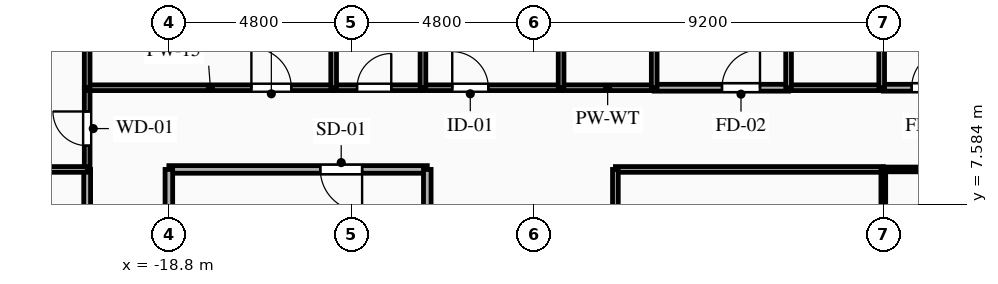
"""IFC4 building model, lengths in metres.
Left out: names, types, materials, properties, quantities, classifications, styles, units other than length and angle.
Written with IfcOpenShell. Run it as: python <this file> out.ifc"""

import sys

from ifc_helpers import new_model, si_unit, direction, frame, frame_2d, origin, place, context, subcontext, project, spatial, rectangle, extrude, element, fill, save


model = new_model("IFC4")
c1 = context("Model", 3, precision=1e-05, world=origin(), true_north=direction((0.0, 1.0)))
c2 = subcontext(c1, "Body", "Model", "MODEL_VIEW")
j1 = project(units=[si_unit("LENGTHUNIT", "METRE"), si_unit("PLANEANGLEUNIT", "RADIAN")], contexts=[c1])
p1 = place(None, origin())
s1 = spatial("IfcSite", under=j1, at=p1, CompositionType="ELEMENT")
p2 = place(p1, origin())
s2 = spatial("IfcBuilding", under=s1, at=p2, CompositionType="ELEMENT")
p3 = place(p2, frame((0.0, 0.0, 137.7)))
s3 = spatial("IfcBuildingStorey", under=s2, at=p3, CompositionType="ELEMENT", Elevation=137.7)
p4 = place(p3, frame((-12.0, 8.5, 0.0), z_axis=(0.0, 0.0, 1.0), x_axis=(-1.0, 0.0, 0.0)))
e1 = element("IfcWall", 1, at=p4, inside=s3, PredefinedType="PARTITIONING", context=c2, shape_type="SweptSolid", body=[
    extrude(rectangle(XDim=6.8, YDim=0.2, at=frame_2d((3.4, 0.0))), origin(), (0.0, 0.0, 1.0), 3.04),
])
p5 = place(p4, frame((1.715, 0.0, 0.0)))
e2 = element("IfcOpeningElement", 2, at=p5, cuts=e1, PredefinedType="OPENING", context=c2, shape_type="SweptSolid", body=[
    extrude(rectangle(XDim=1.1, YDim=2.15, at=frame_2d((0.55, 1.075))), frame((0.0, 0.11, 0.0), z_axis=(0.0, -1.0, 0.0), x_axis=(1.0, 0.0, 0.0)), (0.0, 0.0, 1.0), 0.22),
])
p6 = place(p3, frame((-18.8, 8.5, 0.0), z_axis=(0.0, 0.0, 1.0), x_axis=(0.0, -1.0, 0.0)))
e3 = element("IfcWall", 3, at=p6, inside=s3, PredefinedType="PARTITIONING", context=c2, shape_type="SweptSolid", body=[
    extrude(rectangle(XDim=2.9, YDim=0.2, at=frame_2d((1.45, 0.0))), origin(), (0.0, 0.0, 1.0), 2.525),
])
p7 = place(p3, frame((-12.0, 5.6, 0.0), z_axis=(0.0, 0.0, 1.0), x_axis=(0.0, 1.0, 0.0)))
e4 = element("IfcWall", 4, at=p7, inside=s3, PredefinedType="PARTITIONING", context=c2, shape_type="SweptSolid", body=[
    extrude(rectangle(XDim=2.9, YDim=0.2, at=frame_2d((1.45, 0.0))), origin(), (0.0, 0.0, 1.0), 3.04),
])
p8 = place(p3, frame((-20.95, 8.5, 0.0), z_axis=(0.0, 0.0, 1.0), x_axis=(0.0, 1.0, 0.0)))
e5 = element("IfcWall", 5, at=p8, inside=s3, PredefinedType="PARTITIONING", context=c2, shape_type="SweptSolid", body=[
    extrude(rectangle(XDim=2.15, YDim=0.15, at=frame_2d((1.075, 0.0))), origin(), (0.0, 0.0, 1.0), 3.04),
])
p9 = place(p8, frame((0.625, 0.0, 0.0)))
e6 = element("IfcOpeningElement", 6, at=p9, cuts=e5, PredefinedType="OPENING", context=c2, shape_type="SweptSolid", body=[
    extrude(rectangle(XDim=0.9, YDim=2.1, at=frame_2d((0.45, 1.05))), frame((0.0, 0.085, 0.0), z_axis=(0.0, -1.0, 0.0), x_axis=(1.0, 0.0, 0.0)), (0.0, 0.0, 1.0), 0.17),
])
p10 = place(p3, frame((-20.95, 10.65, 0.0), z_axis=(0.0, 0.0, 1.0), x_axis=(1.0, 0.0, 0.0)))
e7 = element("IfcWall", 7, at=p10, inside=s3, PredefinedType="PARTITIONING", context=c2, shape_type="SweptSolid", body=[
    extrude(rectangle(XDim=6.486, YDim=0.15, at=frame_2d((3.243, 0.0))), origin(), (0.0, 0.0, 1.0), 3.04),
])
p11 = place(p10, frame((4.322, 0.0, 0.0)))
e8 = element("IfcOpeningElement", 8, at=p11, cuts=e7, PredefinedType="OPENING", context=c2, shape_type="SweptSolid", body=[
    extrude(rectangle(XDim=1.05, YDim=2.15, at=frame_2d((0.525, 1.075))), frame((0.0, 0.085, 0.0), z_axis=(0.0, -1.0, 0.0), x_axis=(1.0, 0.0, 0.0)), (0.0, 0.0, 1.0), 0.17),
])
p12 = place(p3, frame((-14.464, 10.65, 0.0), z_axis=(0.0, 0.0, 1.0), x_axis=(1.0, 0.0, 0.0)))
e9 = element("IfcWall", 9, at=p12, inside=s3, PredefinedType="PLUMBINGWALL", context=c2, shape_type="SweptSolid", body=[
    extrude(rectangle(XDim=2.35, YDim=0.15, at=frame_2d((1.175, 0.0))), origin(), (0.0, 0.0, 1.0), 3.04),
])
p13 = place(p12, frame((0.616, 0.0, 0.0)))
e10 = element("IfcOpeningElement", 10, at=p13, cuts=e9, PredefinedType="OPENING", context=c2, shape_type="SweptSolid", body=[
    extrude(rectangle(XDim=0.9, YDim=2.1, at=frame_2d((0.45, 1.05))), frame((0.0, 0.085, 0.0), z_axis=(0.0, -1.0, 0.0), x_axis=(1.0, 0.0, 0.0)), (0.0, 0.0, 1.0), 0.17),
])
p14 = place(p3, frame((-12.114, 10.65, 0.0), z_axis=(0.0, 0.0, 1.0), x_axis=(1.0, 0.0, 0.0)))
e11 = element("IfcWall", 11, at=p14, inside=s3, PredefinedType="PARTITIONING", context=c2, shape_type="SweptSolid", body=[
    extrude(rectangle(XDim=3.635, YDim=0.15, at=frame_2d((1.817, 0.0))), origin(), (0.0, 0.0, 1.0), 3.04),
])
p15 = place(p14, frame((0.771, 0.0, 0.0)))
e12 = element("IfcOpeningElement", 12, at=p15, cuts=e11, PredefinedType="OPENING", context=c2, shape_type="SweptSolid", body=[
    extrude(rectangle(XDim=0.95, YDim=2.1, at=frame_2d((0.475, 1.05))), frame((0.0, 0.085, 0.0), z_axis=(0.0, -1.0, 0.0), x_axis=(1.0, 0.0, 0.0)), (0.0, 0.0, 1.0), 0.17),
])
p16 = place(p3, frame((-6.029, 10.65, 0.0), z_axis=(0.0, 0.0, 1.0), x_axis=(1.0, 0.0, 0.0)))
e13 = element("IfcWall", 13, at=p16, inside=s3, PredefinedType="PARTITIONING", context=c2, shape_type="SweptSolid", body=[
    extrude(rectangle(XDim=3.536, YDim=0.18, at=frame_2d((1.768, 0.0))), origin(), (0.0, 0.0, 1.0), 3.04),
])
p17 = place(p16, frame((1.784, 0.0, 0.0)))
e14 = element("IfcOpeningElement", 14, at=p17, cuts=e13, PredefinedType="OPENING", context=c2, shape_type="SweptSolid", body=[
    extrude(rectangle(XDim=1.0, YDim=2.15, at=frame_2d((0.5, 1.075))), frame((0.0, 0.1, 0.0), z_axis=(0.0, -1.0, 0.0), x_axis=(1.0, 0.0, 0.0)), (0.0, 0.0, 1.0), 0.2),
])
for number, where, z_axis, x_axis in (
    (15, (-8.479, 10.65, 0.0), (0.0, 0.0, 1.0), (1.0, 0.0, 0.0)),
    (16, (-2.493, 10.65, 0.0), (0.0, 0.0, 1.0), (1.0, 0.0, 0.0)),
):
    element("IfcWall", number, at=place(p3, frame(where, z_axis=z_axis, x_axis=x_axis)), inside=s3, PredefinedType="PLUMBINGWALL", context=c2, shape_type="SweptSolid", body=[
        extrude(rectangle(XDim=2.45, YDim=0.15, at=frame_2d((1.225, 0.0))), origin(), (0.0, 0.0, 1.0), 3.04),
    ])
p18 = place(p3, frame((0.0, 8.5, 0.0), z_axis=(0.0, 0.0, 1.0), x_axis=(-1.0, 0.0, 0.0)))
e17 = element("IfcWall", 17, at=p18, inside=s3, PredefinedType="PARTITIONING", context=c2, shape_type="SweptSolid", body=[
    extrude(rectangle(XDim=7.05, YDim=0.15, at=frame_2d((3.525, 0.0))), origin(), (0.0, 0.0, 1.0), 3.04),
])
p19 = place(p3, frame((0.0, 10.65, 0.0), z_axis=(0.0, 0.0, 1.0), x_axis=(1.0, 0.0, 0.0)))
e18 = element("IfcWall", 18, at=p19, inside=s3, PredefinedType="PARTITIONING", context=c2, shape_type="SweptSolid", body=[
    extrude(rectangle(XDim=3.493, YDim=0.18, at=frame_2d((1.747, 0.0))), origin(), (0.0, 0.0, 1.0), 3.04),
])
p20 = place(p19, frame((0.747, 0.0, 0.0)))
e19 = element("IfcOpeningElement", 19, at=p20, cuts=e18, PredefinedType="OPENING", context=c2, shape_type="SweptSolid", body=[
    extrude(rectangle(XDim=1.0, YDim=2.15, at=frame_2d((0.5, 1.075))), frame((0.0, 0.1, 0.0), z_axis=(0.0, -1.0, 0.0), x_axis=(1.0, 0.0, 0.0)), (0.0, 0.0, 1.0), 0.2),
])
p21 = place(p3, frame((7.05, 8.5, 0.0), z_axis=(0.0, 0.0, 1.0), x_axis=(-1.0, 0.0, 0.0)))
e20 = element("IfcWall", 20, at=p21, inside=s3, PredefinedType="PARTITIONING", context=c2, shape_type="SweptSolid", body=[
    extrude(rectangle(XDim=7.05, YDim=0.125, at=frame_2d((3.525, 0.0))), origin(), (0.0, 0.0, 1.0), 3.04),
])
p22 = place(p3, frame((-20.95, -5.6, 0.0), z_axis=(0.0, 0.0, 1.0), x_axis=(0.0, 1.0, 0.0)))
e21 = element("IfcWall", 21, at=p22, inside=s3, PredefinedType="PARTITIONING", context=c2, shape_type="SweptSolid", body=[
    extrude(rectangle(XDim=14.1, YDim=0.18, at=frame_2d((7.05, 0.0))), origin(), (0.0, 0.0, 1.0), 3.04),
])
p23 = place(p22, frame((5.058, 0.0, 0.0)))
e22 = element("IfcOpeningElement", 22, at=p23, cuts=e21, PredefinedType="OPENING", context=c2, shape_type="SweptSolid", body=[
    extrude(rectangle(XDim=1.0, YDim=2.15, at=frame_2d((0.5, 1.075))), frame((0.0, 0.1, 0.0), z_axis=(0.0, -1.0, 0.0), x_axis=(1.0, 0.0, 0.0)), (0.0, 0.0, 1.0), 0.2),
])
p24 = place(p3, frame((-7.05, 8.5, 0.0), z_axis=(0.0, 0.0, 1.0), x_axis=(0.0, -1.0, 0.0)))
e23 = element("IfcWall", 23, at=p24, inside=s3, PredefinedType="PARTITIONING", context=c2, shape_type="SweptSolid", body=[
    extrude(rectangle(XDim=9.3, YDim=0.15, at=frame_2d((4.65, 0.0))), origin(), (0.0, 0.0, 1.0), 3.04),
])
p25 = place(p24, frame((6.784, 0.0, 0.0)))
e24 = element("IfcOpeningElement", 24, at=p25, cuts=e23, PredefinedType="OPENING", context=c2, shape_type="SweptSolid", body=[
    extrude(rectangle(XDim=1.05, YDim=2.15, at=frame_2d((0.525, 1.075))), frame((0.0, 0.085, 0.0), z_axis=(0.0, -1.0, 0.0), x_axis=(1.0, 0.0, 0.0)), (0.0, 0.0, 1.0), 0.17),
])
p26 = place(p3, frame((-23.6, 8.5, 0.0), z_axis=(0.0, 0.0, 1.0), x_axis=(1.0, 0.0, 0.0)))
e25 = element("IfcWall", 25, at=p26, inside=s3, PredefinedType="PARTITIONING", context=c2, shape_type="SweptSolid", body=[
    extrude(rectangle(XDim=2.65, YDim=0.15, at=frame_2d((1.325, 0.0))), origin(), (0.0, 0.0, 1.0), 3.04),
])
p27 = place(p26, frame((0.635, 0.0, 0.0)))
e26 = element("IfcOpeningElement", 26, at=p27, cuts=e25, PredefinedType="OPENING", context=c2, shape_type="SweptSolid", body=[
    extrude(rectangle(XDim=1.05, YDim=2.15, at=frame_2d((0.525, 1.075))), frame((0.0, 0.085, 0.0), z_axis=(0.0, -1.0, 0.0), x_axis=(1.0, 0.0, 0.0)), (0.0, 0.0, 1.0), 0.17),
])
p28 = place(p3, frame((-20.95, 20.4, 0.0), z_axis=(0.0, 0.0, 1.0), x_axis=(0.0, -1.0, 0.0)))
e27 = element("IfcWall", 27, at=p28, inside=s3, PredefinedType="PARTITIONING", context=c2, shape_type="SweptSolid", body=[
    extrude(rectangle(XDim=9.75, YDim=0.15, at=frame_2d((4.875, 0.0))), origin(), (0.0, 0.0, 1.0), 3.04),
])
for number, where, z_axis, x_axis in (
    (28, (-14.464, 20.4, 0.0), (0.0, 0.0, 1.0), (0.0, -1.0, 0.0)),
    (29, (-12.114, 20.4, 0.0), (0.0, 0.0, 1.0), (0.0, -1.0, 0.0)),
):
    element("IfcWall", number, at=place(p3, frame(where, z_axis=z_axis, x_axis=x_axis)), inside=s3, PredefinedType="PLUMBINGWALL", context=c2, shape_type="SweptSolid", body=[
        extrude(rectangle(XDim=9.75, YDim=0.15, at=frame_2d((4.875, 0.0))), origin(), (0.0, 0.0, 1.0), 3.04),
    ])
for number, where, z_axis, x_axis in (
    (30, (-8.479, 12.8, 0.0), (0.0, 0.0, 1.0), (0.0, -1.0, 0.0)),
    (31, (-6.029, 10.65, 0.0), (0.0, 0.0, 1.0), (0.0, 1.0, 0.0)),
    (32, (-2.493, 12.8, 0.0), (0.0, 0.0, 1.0), (0.0, -1.0, 0.0)),
    (33, (-0.043, 10.65, 0.0), (0.0, 0.0, 1.0), (0.0, 1.0, 0.0)),
):
    element("IfcWall", number, at=place(p3, frame(where, z_axis=z_axis, x_axis=x_axis)), inside=s3, PredefinedType="PLUMBINGWALL", context=c2, shape_type="SweptSolid", body=[
        extrude(rectangle(XDim=2.15, YDim=0.15, at=frame_2d((1.075, 0.0))), origin(), (0.0, 0.0, 1.0), 3.04),
    ])
p29 = place(p3, frame((0.0, 8.5, 0.0), z_axis=(0.0, 0.0, 1.0), x_axis=(0.0, -1.0, 0.0)))
e34 = element("IfcWall", 34, at=p29, inside=s3, PredefinedType="PARTITIONING", context=c2, shape_type="SweptSolid", body=[
    extrude(rectangle(XDim=9.3, YDim=0.125, at=frame_2d((4.65, 0.0))), origin(), (0.0, 0.0, 1.0), 3.04),
])
p30 = place(p5, origin())
e35 = element("IfcDoor", 35, at=p30, inside=s3, OperationType="SINGLE_SWING_LEFT", PredefinedType="DOOR", context=c2, shape_type="SweptSolid", body=[
    extrude(rectangle(XDim=1.1, YDim=2.15, at=frame_2d((0.55, 1.075))), frame((0.0, 0.025, 0.0), z_axis=(0.0, -1.0, 0.0), x_axis=(1.0, 0.0, 0.0)), (0.0, 0.0, 1.0), 0.05),
])
fill(e2, e35)
p31 = place(p9, origin())
e36 = element("IfcDoor", 36, at=p31, inside=s3, OperationType="SINGLE_SWING_RIGHT", PredefinedType="DOOR", context=c2, shape_type="SweptSolid", body=[
    extrude(rectangle(XDim=0.9, YDim=2.1, at=frame_2d((0.45, 1.05))), frame((0.0, 0.025, 0.0), z_axis=(0.0, -1.0, 0.0), x_axis=(1.0, 0.0, 0.0)), (0.0, 0.0, 1.0), 0.05),
])
fill(e6, e36)
p32 = place(p11, origin())
e37 = element("IfcDoor", 37, at=p32, inside=s3, OperationType="SINGLE_SWING_LEFT", PredefinedType="DOOR", context=c2, shape_type="SweptSolid", body=[
    extrude(rectangle(XDim=1.05, YDim=2.15, at=frame_2d((0.525, 1.075))), frame((0.0, 0.025, 0.0), z_axis=(0.0, -1.0, 0.0), x_axis=(1.0, 0.0, 0.0)), (0.0, 0.0, 1.0), 0.05),
])
fill(e8, e37)
p33 = place(p13, origin())
e38 = element("IfcDoor", 38, at=p33, inside=s3, OperationType="SINGLE_SWING_RIGHT", PredefinedType="DOOR", context=c2, shape_type="SweptSolid", body=[
    extrude(rectangle(XDim=0.9, YDim=2.1, at=frame_2d((0.45, 1.05))), frame((0.0, 0.025, 0.0), z_axis=(0.0, -1.0, 0.0), x_axis=(1.0, 0.0, 0.0)), (0.0, 0.0, 1.0), 0.05),
])
fill(e10, e38)
p34 = place(p15, origin())
e39 = element("IfcDoor", 39, at=p34, inside=s3, OperationType="SINGLE_SWING_LEFT", PredefinedType="DOOR", context=c2, shape_type="SweptSolid", body=[
    extrude(rectangle(XDim=0.95, YDim=2.1, at=frame_2d((0.475, 1.05))), frame((0.0, 0.025, 0.0), z_axis=(0.0, -1.0, 0.0), x_axis=(1.0, 0.0, 0.0)), (0.0, 0.0, 1.0), 0.05),
])
fill(e12, e39)
p35 = place(p17, origin())
e40 = element("IfcDoor", 40, at=p35, inside=s3, OperationType="SINGLE_SWING_RIGHT", PredefinedType="DOOR", context=c2, shape_type="SweptSolid", body=[
    extrude(rectangle(XDim=1.0, YDim=2.15, at=frame_2d((0.5, 1.075))), frame((0.0, 0.025, 0.0), z_axis=(0.0, -1.0, 0.0), x_axis=(1.0, 0.0, 0.0)), (0.0, 0.0, 1.0), 0.05),
])
fill(e14, e40)
p36 = place(p20, origin())
e41 = element("IfcDoor", 41, at=p36, inside=s3, OperationType="SINGLE_SWING_RIGHT", PredefinedType="DOOR", context=c2, shape_type="SweptSolid", body=[
    extrude(rectangle(XDim=1.0, YDim=2.15, at=frame_2d((0.5, 1.075))), frame((0.0, 0.025, 0.0), z_axis=(0.0, -1.0, 0.0), x_axis=(1.0, 0.0, 0.0)), (0.0, 0.0, 1.0), 0.05),
])
fill(e19, e41)
save(model, sys.argv[1])
